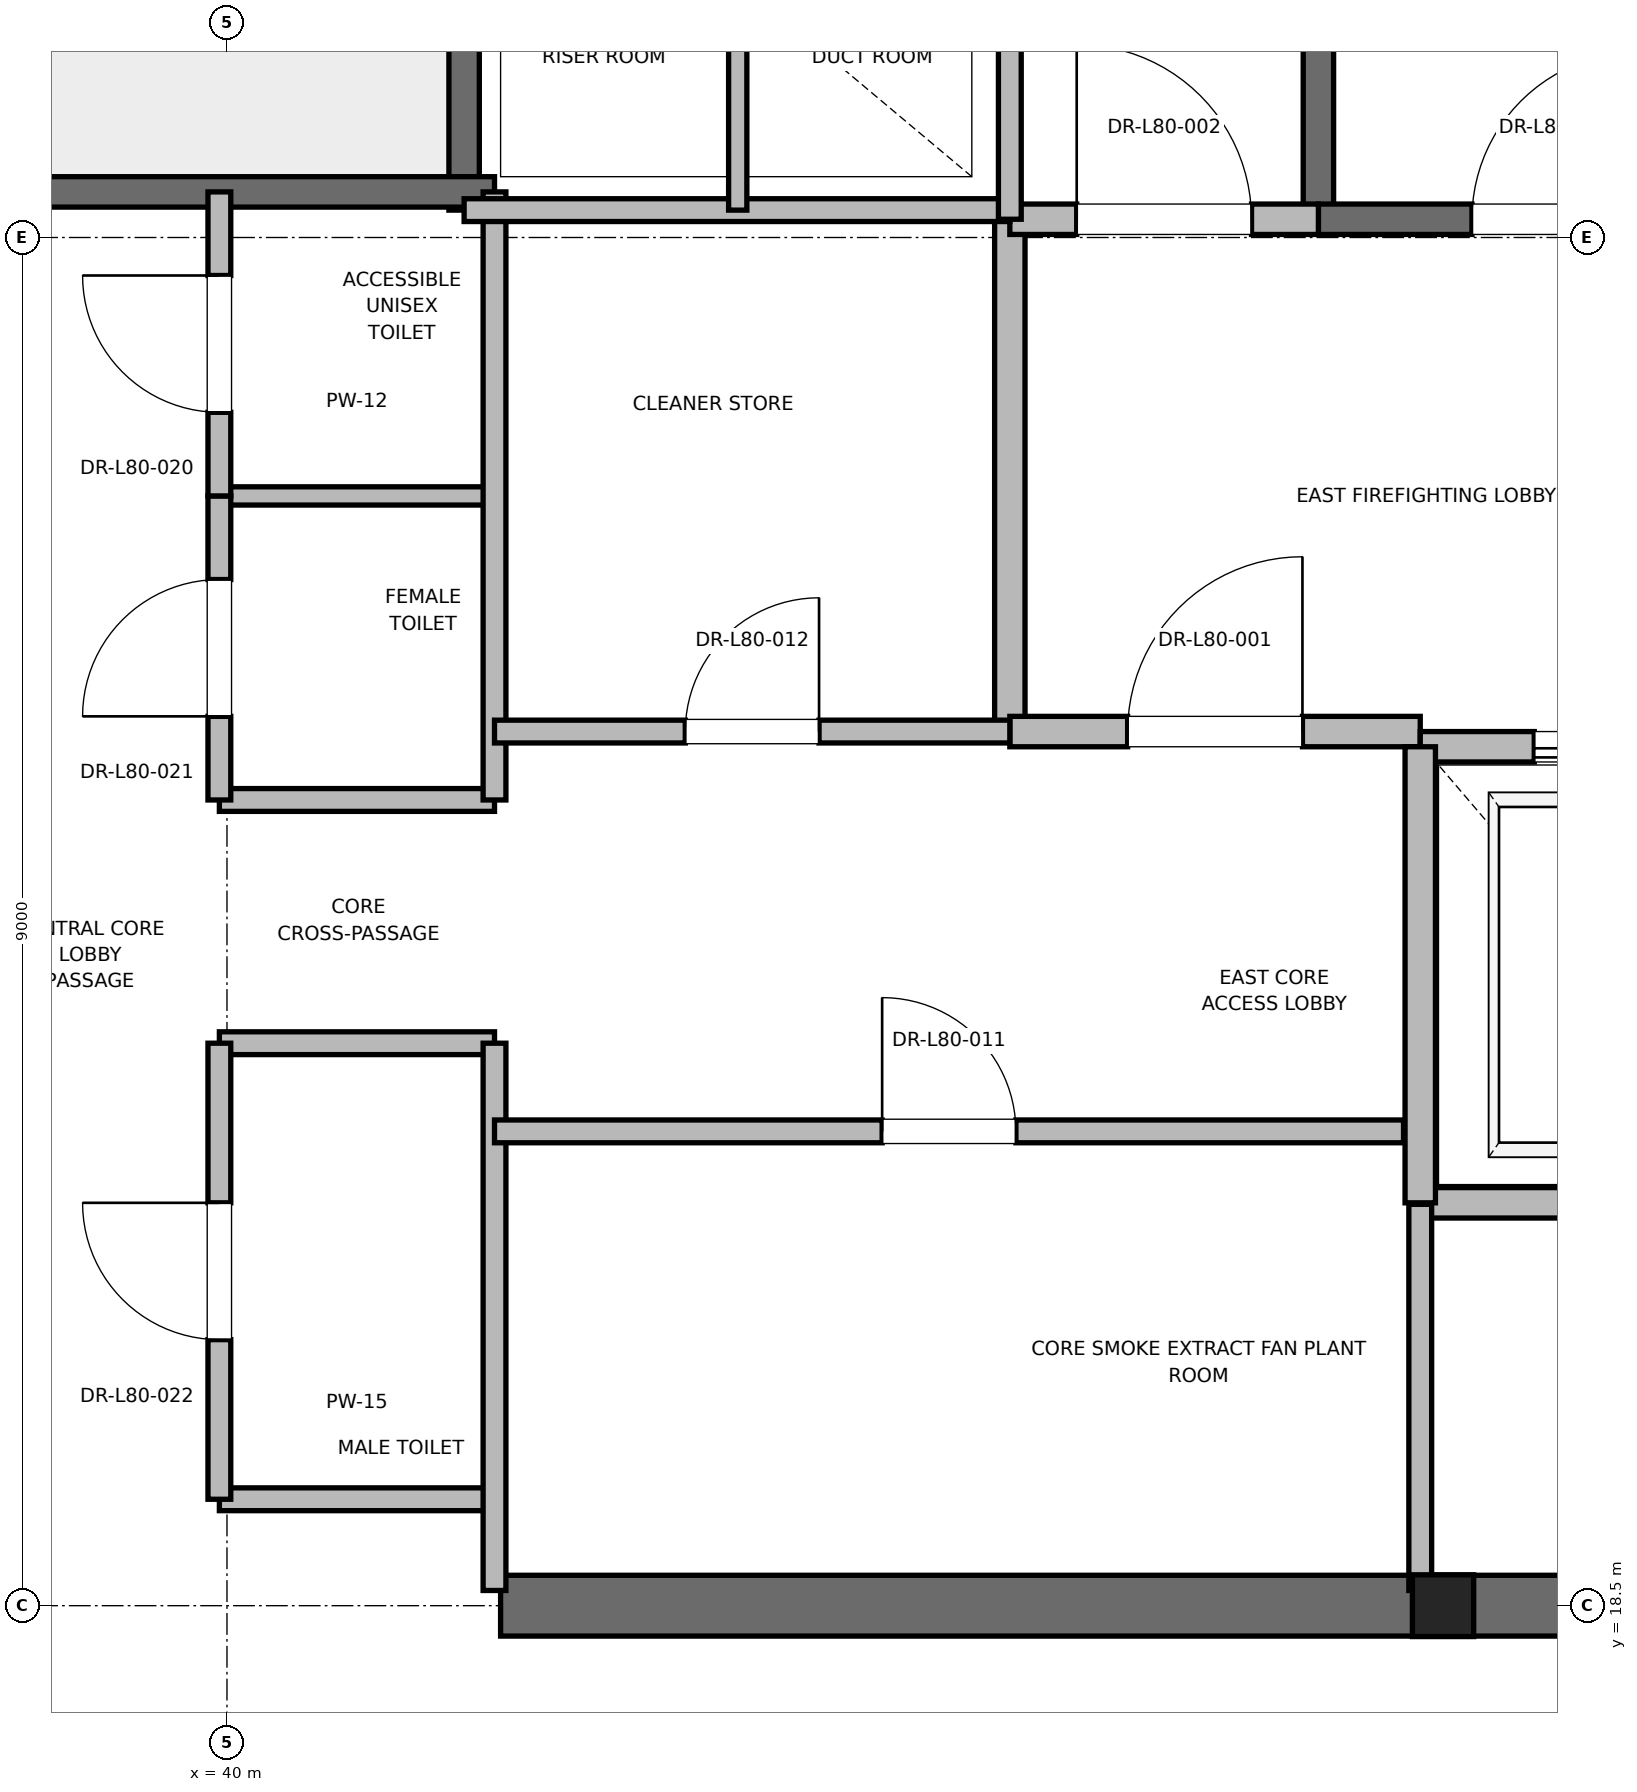
"""IFC4 building model, lengths in metres.
Left out: names, types, materials, properties, quantities, classifications, styles, units other than length and angle.
Written with IfcOpenShell. Run it as: python <this file> out.ifc"""

import sys

from ifc_helpers import new_model, si_unit, direction, frame, frame_2d, origin, origin_2d, place, context, subcontext, project, spatial, rectangle, i_section, extrude, element, fill, save


model = new_model("IFC4")
c1 = context("Model", 3, precision=1e-05, world=origin(), true_north=direction((0.0, 1.0)))
c2 = subcontext(c1, "Body", "Model", "MODEL_VIEW")
j1 = project(units=[si_unit("LENGTHUNIT", "METRE"), si_unit("PLANEANGLEUNIT", "RADIAN")], contexts=[c1])
p1 = place(None, origin())
s1 = spatial("IfcSite", under=j1, at=p1, CompositionType="ELEMENT")
p2 = place(p1, origin())
s2 = spatial("IfcBuilding", under=s1, at=p2, CompositionType="ELEMENT")
p3 = place(p2, frame((0.0, 0.0, 342.8)))
s3 = spatial("IfcBuildingStorey", under=s2, at=p3, CompositionType="ELEMENT", Elevation=342.8)
p4 = place(p3, frame((48.0, 18.5, 0.0), z_axis=(0.0, 0.0, 1.0), x_axis=(1.0, 0.0, 0.0)))
e1 = element("IfcColumn", 1, at=p4, inside=s3, PredefinedType="COLUMN", context=c2, shape_type="SweptSolid", body=[
    extrude(i_section(OverallWidth=0.403, OverallDepth=0.406, WebThickness=0.027, FlangeThickness=0.043, FilletRadius=0.015, at=origin_2d()), origin(), (0.0, 0.0, 1.0), 6.0),
])
p5 = place(p3, frame((41.8, 18.5, 0.0), z_axis=(0.0, 0.0, 1.0), x_axis=(1.0, 0.0, 0.0)))
e2 = element("IfcWall", 2, at=p5, inside=s3, PredefinedType="SHEAR", context=c2, shape_type="SweptSolid", body=[
    extrude(rectangle(XDim=9.2, YDim=0.4, at=frame_2d((4.6, 0.0))), origin(), (0.0, 0.0, 1.0), 5.7),
])
p6 = place(p3, frame((47.18, 27.62, 0.0), z_axis=(0.0, 0.0, 1.0), x_axis=(0.0, 1.0, 0.0)))
e3 = element("IfcWall", 3, at=p6, inside=s3, PredefinedType="SOLIDWALL", context=c2, shape_type="SweptSolid", body=[
    extrude(rectangle(XDim=8.18, YDim=0.2, at=frame_2d((4.09, 0.0))), origin(), (0.0, 0.0, 1.0), 5.7),
])
p7 = place(p3, frame((47.18, 27.62, 0.0), z_axis=(0.0, 0.0, 1.0), x_axis=(1.0, 0.0, 0.0)))
e4 = element("IfcWall", 4, at=p7, inside=s3, PredefinedType="SOLIDWALL", context=c2, shape_type="SweptSolid", body=[
    extrude(rectangle(XDim=3.12, YDim=0.2, at=frame_2d((1.56, 0.0))), origin(), (0.0, 0.0, 1.0), 5.7),
])
p8 = place(p7, frame((1.01, 0.0, 0.0)))
e5 = element("IfcOpeningElement", 5, at=p8, cuts=e4, PredefinedType="OPENING", context=c2, shape_type="SweptSolid", body=[
    extrude(rectangle(XDim=1.1, YDim=2.15, at=frame_2d((0.55, 1.075))), frame((0.0, 0.1, 0.0), z_axis=(0.0, -1.0, 0.0), x_axis=(1.0, 0.0, 0.0)), (0.0, 0.0, 1.0), 0.2),
])
p9 = place(p3, frame((41.56, 27.68, 0.0), z_axis=(0.0, 0.0, 1.0), x_axis=(0.0, 1.0, 0.0)))
e6 = element("IfcWall", 6, at=p9, inside=s3, PredefinedType="SOLIDWALL", context=c2, shape_type="SweptSolid", body=[
    extrude(rectangle(XDim=8.57, YDim=0.2, at=frame_2d((4.285, 0.0))), origin(), (0.0, 0.0, 1.0), 5.7),
])
p10 = place(p3, frame((38.44, 27.8, 0.0), z_axis=(0.0, 0.0, 1.0), x_axis=(1.0, 0.0, 0.0)))
e7 = element("IfcWall", 7, at=p10, inside=s3, PredefinedType="SOLIDWALL", context=c2, shape_type="SweptSolid", body=[
    extrude(rectangle(XDim=3.32, YDim=0.2, at=frame_2d((1.66, 0.0))), origin(), (0.0, 0.0, 1.0), 5.7),
])
p11 = place(p3, frame((45.15, 24.25, 0.0), z_axis=(0.0, 0.0, 1.0), x_axis=(0.0, 1.0, 0.0)))
e8 = element("IfcWall", 8, at=p11, inside=s3, PredefinedType="PARTITIONING", context=c2, shape_type="SweptSolid", body=[
    extrude(rectangle(XDim=3.37, YDim=0.2, at=frame_2d((1.685, 0.0))), origin(), (0.0, 0.0, 1.0), 5.7),
])
p12 = place(p3, frame((45.15, 24.25, 0.0), z_axis=(0.0, 0.0, 1.0), x_axis=(1.0, 0.0, 0.0)))
e9 = element("IfcWall", 9, at=p12, inside=s3, PredefinedType="PARTITIONING", context=c2, shape_type="SweptSolid", body=[
    extrude(rectangle(XDim=2.7, YDim=0.2, at=frame_2d((1.35, 0.0))), origin(), (0.0, 0.0, 1.0), 5.7),
])
p13 = place(p12, frame((0.775, 0.0, 0.0)))
e10 = element("IfcOpeningElement", 10, at=p13, cuts=e9, PredefinedType="OPENING", context=c2, shape_type="SweptSolid", body=[
    extrude(rectangle(XDim=1.15, YDim=2.2, at=frame_2d((0.575, 1.1))), frame((0.0, 0.1, 0.0), z_axis=(0.0, -1.0, 0.0), x_axis=(1.0, 0.0, 0.0)), (0.0, 0.0, 1.0), 0.2),
])
p14 = place(p3, frame((45.15, 27.62, 0.0), z_axis=(0.0, 0.0, 1.0), x_axis=(1.0, 0.0, 0.0)))
e11 = element("IfcWall", 11, at=p14, inside=s3, PredefinedType="PARTITIONING", context=c2, shape_type="SweptSolid", body=[
    extrude(rectangle(XDim=2.03, YDim=0.2, at=frame_2d((1.015, 0.0))), origin(), (0.0, 0.0, 1.0), 5.7),
])
p15 = place(p14, frame((0.44, 0.0, 0.0)))
e12 = element("IfcOpeningElement", 12, at=p15, cuts=e11, PredefinedType="OPENING", context=c2, shape_type="SweptSolid", body=[
    extrude(rectangle(XDim=1.15, YDim=2.2, at=frame_2d((0.575, 1.1))), frame((0.0, 0.1, 0.0), z_axis=(0.0, -1.0, 0.0), x_axis=(1.0, 0.0, 0.0)), (0.0, 0.0, 1.0), 0.2),
])
p16 = place(p3, frame((47.85, 21.15, 0.0), z_axis=(0.0, 0.0, 1.0), x_axis=(1.0, 0.0, 0.0)))
e13 = element("IfcWall", 13, at=p16, inside=s3, PredefinedType="SOLIDWALL", context=c2, shape_type="SweptSolid", body=[
    extrude(rectangle(XDim=2.6, YDim=0.2, at=frame_2d((1.3, 0.0))), origin(), (0.0, 0.0, 1.0), 5.7),
])
p17 = place(p3, frame((50.45, 24.15, 0.0), z_axis=(0.0, 0.0, 1.0), x_axis=(-1.0, 0.0, 0.0)))
e14 = element("IfcWall", 14, at=p17, inside=s3, PredefinedType="SOLIDWALL", context=c2, shape_type="SweptSolid", body=[
    extrude(rectangle(XDim=2.6, YDim=0.2, at=frame_2d((1.3, 0.0))), origin(), (0.0, 0.0, 1.0), 4.78),
])
p18 = place(p17, frame((0.75, 0.0, 0.0)))
e15 = element("IfcOpeningElement", 15, at=p18, cuts=e14, PredefinedType="OPENING", context=c2, shape_type="SweptSolid", body=[
    extrude(rectangle(XDim=1.1, YDim=2.2, at=frame_2d((0.55, 1.1))), frame((0.0, 0.1, 0.0), z_axis=(0.0, -1.0, 0.0), x_axis=(1.0, 0.0, 0.0)), (0.0, 0.0, 1.0), 0.2),
])
p19 = place(p3, frame((47.85, 24.15, 0.0), z_axis=(0.0, 0.0, 1.0), x_axis=(0.0, -1.0, 0.0)))
e16 = element("IfcWall", 16, at=p19, inside=s3, PredefinedType="SOLIDWALL", context=c2, shape_type="SweptSolid", body=[
    extrude(rectangle(XDim=3.0, YDim=0.2, at=frame_2d((1.5, 0.0))), origin(), (0.0, 0.0, 1.0), 5.7),
])
for number, where, z_axis, x_axis in (
    (17, (39.95, 19.2, 0.0), (0.0, 0.0, 1.0), (1.0, 0.0, 0.0)),
    (18, (39.95, 22.2, 0.0), (0.0, 0.0, 1.0), (1.0, 0.0, 0.0)),
    (19, (39.95, 23.8, 0.0), (0.0, 0.0, 1.0), (1.0, 0.0, 0.0)),
):
    element("IfcWall", number, at=place(p3, frame(where, z_axis=z_axis, x_axis=x_axis)), inside=s3, PredefinedType="PARTITIONING", context=c2, shape_type="SweptSolid", body=[
        extrude(rectangle(XDim=1.81, YDim=0.15, at=frame_2d((0.905, 0.0))), origin(), (0.0, 0.0, 1.0), 2.85),
    ])
p20 = place(p3, frame((39.95, 25.8, 0.0), z_axis=(0.0, 0.0, 1.0), x_axis=(1.0, 0.0, 0.0)))
e20 = element("IfcWall", 20, at=p20, inside=s3, PredefinedType="PARTITIONING", context=c2, shape_type="SweptSolid", body=[
    extrude(rectangle(XDim=1.81, YDim=0.12, at=frame_2d((0.905, 0.0))), origin(), (0.0, 0.0, 1.0), 2.85),
])
p21 = place(p3, frame((41.76, 18.6, 0.0), z_axis=(0.0, 0.0, 1.0), x_axis=(0.0, 1.0, 0.0)))
e21 = element("IfcWall", 21, at=p21, inside=s3, PredefinedType="PARTITIONING", context=c2, shape_type="SweptSolid", body=[
    extrude(rectangle(XDim=3.6, YDim=0.15, at=frame_2d((1.8, 0.0))), origin(), (0.0, 0.0, 1.0), 2.85),
])
p22 = place(p3, frame((41.76, 23.8, 0.0), z_axis=(0.0, 0.0, 1.0), x_axis=(0.0, 1.0, 0.0)))
e22 = element("IfcWall", 22, at=p22, inside=s3, PredefinedType="PARTITIONING", context=c2, shape_type="SweptSolid", body=[
    extrude(rectangle(XDim=4.0, YDim=0.15, at=frame_2d((2.0, 0.0))), origin(), (0.0, 0.0, 1.0), 2.85),
])
p23 = place(p3, frame((39.95, 19.2, 0.0), z_axis=(0.0, 0.0, 1.0), x_axis=(0.0, 1.0, 0.0)))
e23 = element("IfcWall", 23, at=p23, inside=s3, PredefinedType="PARTITIONING", context=c2, shape_type="SweptSolid", body=[
    extrude(rectangle(XDim=3.0, YDim=0.15, at=frame_2d((1.5, 0.0))), origin(), (0.0, 0.0, 1.0), 2.85),
])
p24 = place(p23, frame((1.05, 0.0, 0.0)))
e24 = element("IfcOpeningElement", 24, at=p24, cuts=e23, PredefinedType="OPENING", context=c2, shape_type="SweptSolid", body=[
    extrude(rectangle(XDim=0.9, YDim=2.1, at=frame_2d((0.45, 1.05))), frame((0.0, 0.075, 0.0), z_axis=(0.0, -1.0, 0.0), x_axis=(1.0, 0.0, 0.0)), (0.0, 0.0, 1.0), 0.15),
])
p25 = place(p3, frame((39.95, 23.8, 0.0), z_axis=(0.0, 0.0, 1.0), x_axis=(0.0, 1.0, 0.0)))
e25 = element("IfcWall", 25, at=p25, inside=s3, PredefinedType="PARTITIONING", context=c2, shape_type="SweptSolid", body=[
    extrude(rectangle(XDim=2.0, YDim=0.15, at=frame_2d((1.0, 0.0))), origin(), (0.0, 0.0, 1.0), 2.85),
])
p26 = place(p25, frame((0.55, 0.0, 0.0)))
e26 = element("IfcOpeningElement", 26, at=p26, cuts=e25, PredefinedType="OPENING", context=c2, shape_type="SweptSolid", body=[
    extrude(rectangle(XDim=0.9, YDim=2.1, at=frame_2d((0.45, 1.05))), frame((0.0, 0.075, 0.0), z_axis=(0.0, -1.0, 0.0), x_axis=(1.0, 0.0, 0.0)), (0.0, 0.0, 1.0), 0.15),
])
p27 = place(p3, frame((39.95, 25.8, 0.0), z_axis=(0.0, 0.0, 1.0), x_axis=(0.0, 1.0, 0.0)))
e27 = element("IfcWall", 27, at=p27, inside=s3, PredefinedType="PARTITIONING", context=c2, shape_type="SweptSolid", body=[
    extrude(rectangle(XDim=2.0, YDim=0.15, at=frame_2d((1.0, 0.0))), origin(), (0.0, 0.0, 1.0), 2.85),
])
p28 = place(p27, frame((0.55, 0.0, 0.0)))
e28 = element("IfcOpeningElement", 28, at=p28, cuts=e27, PredefinedType="OPENING", context=c2, shape_type="SweptSolid", body=[
    extrude(rectangle(XDim=0.9, YDim=2.1, at=frame_2d((0.45, 1.05))), frame((0.0, 0.075, 0.0), z_axis=(0.0, -1.0, 0.0), x_axis=(1.0, 0.0, 0.0)), (0.0, 0.0, 1.0), 0.15),
])
p29 = place(p3, frame((41.56, 27.68, 0.0), z_axis=(0.0, 0.0, 1.0), x_axis=(1.0, 0.0, 0.0)))
e29 = element("IfcWall", 29, at=p29, inside=s3, PredefinedType="PARTITIONING", context=c2, shape_type="SweptSolid", body=[
    extrude(rectangle(XDim=3.59, YDim=0.15, at=frame_2d((1.795, 0.0))), origin(), (0.0, 0.0, 1.0), 2.85),
])
p30 = place(p3, frame((47.85, 18.6, 0.0), z_axis=(0.0, 0.0, 1.0), x_axis=(0.0, 1.0, 0.0)))
e30 = element("IfcWall", 30, at=p30, inside=s3, PredefinedType="PARTITIONING", context=c2, shape_type="SweptSolid", body=[
    extrude(rectangle(XDim=2.54, YDim=0.15, at=frame_2d((1.27, 0.0))), origin(), (0.0, 0.0, 1.0), 2.85),
])
p31 = place(p3, frame((41.76, 21.62, 0.0), z_axis=(0.0, 0.0, 1.0), x_axis=(1.0, 0.0, 0.0)))
e31 = element("IfcWall", 31, at=p31, inside=s3, PredefinedType="PARTITIONING", context=c2, shape_type="SweptSolid", body=[
    extrude(rectangle(XDim=5.98, YDim=0.15, at=frame_2d((2.99, 0.0))), origin(), (0.0, 0.0, 1.0), 2.85),
])
p32 = place(p31, frame((2.55, 0.0, 0.0)))
e32 = element("IfcOpeningElement", 32, at=p32, cuts=e31, PredefinedType="OPENING", context=c2, shape_type="SweptSolid", body=[
    extrude(rectangle(XDim=0.88, YDim=2.1, at=frame_2d((0.44, 1.05))), frame((0.0, 0.075, 0.0), z_axis=(0.0, -1.0, 0.0), x_axis=(1.0, 0.0, 0.0)), (0.0, 0.0, 1.0), 0.15),
])
p33 = place(p3, frame((41.76, 24.25, 0.0), z_axis=(0.0, 0.0, 1.0), x_axis=(1.0, 0.0, 0.0)))
e33 = element("IfcWall", 33, at=p33, inside=s3, PredefinedType="PARTITIONING", context=c2, shape_type="SweptSolid", body=[
    extrude(rectangle(XDim=3.39, YDim=0.15, at=frame_2d((1.695, 0.0))), origin(), (0.0, 0.0, 1.0), 2.85),
])
p34 = place(p33, frame((1.255, 0.0, 0.0)))
e34 = element("IfcOpeningElement", 34, at=p34, cuts=e33, PredefinedType="OPENING", context=c2, shape_type="SweptSolid", body=[
    extrude(rectangle(XDim=0.88, YDim=2.1, at=frame_2d((0.44, 1.05))), frame((0.0, 0.075, 0.0), z_axis=(0.0, -1.0, 0.0), x_axis=(1.0, 0.0, 0.0)), (0.0, 0.0, 1.0), 0.15),
])
p35 = place(p3, frame((45.15, 27.62, 0.0), z_axis=(0.0, 0.0, 1.0), x_axis=(0.0, 1.0, 0.0)))
e35 = element("IfcWall", 35, at=p35, inside=s3, PredefinedType="PARTITIONING", context=c2, shape_type="SweptSolid", body=[
    extrude(rectangle(XDim=3.1, YDim=0.15, at=frame_2d((1.55, 0.0))), origin(), (0.0, 0.0, 1.0), 2.85),
])
p36 = place(p3, frame((43.36, 27.68, 0.0), z_axis=(0.0, 0.0, 1.0), x_axis=(0.0, 1.0, 0.0)))
e36 = element("IfcWall", 36, at=p36, inside=s3, PredefinedType="PARTITIONING", context=c2, shape_type="SweptSolid", body=[
    extrude(rectangle(XDim=3.04, YDim=0.12, at=frame_2d((1.52, 0.0))), origin(), (0.0, 0.0, 1.0), 2.85),
])
p37 = place(p8, origin())
e37 = element("IfcDoor", 37, at=p37, inside=s3, OperationType="SINGLE_SWING_RIGHT", PredefinedType="DOOR", context=c2, shape_type="SweptSolid", body=[
    extrude(rectangle(XDim=1.1, YDim=2.15, at=frame_2d((0.55, 1.075))), frame((0.0, 0.025, 0.0), z_axis=(0.0, -1.0, 0.0), x_axis=(1.0, 0.0, 0.0)), (0.0, 0.0, 1.0), 0.05),
])
fill(e5, e37)
p38 = place(p13, origin())
e38 = element("IfcDoor", 38, at=p38, inside=s3, OperationType="SINGLE_SWING_RIGHT", PredefinedType="DOOR", context=c2, shape_type="SweptSolid", body=[
    extrude(rectangle(XDim=1.15, YDim=2.2, at=frame_2d((0.575, 1.1))), frame((0.0, 0.025, 0.0), z_axis=(0.0, -1.0, 0.0), x_axis=(1.0, 0.0, 0.0)), (0.0, 0.0, 1.0), 0.05),
])
fill(e10, e38)
p39 = place(p15, origin())
e39 = element("IfcDoor", 39, at=p39, inside=s3, OperationType="SINGLE_SWING_LEFT", PredefinedType="DOOR", context=c2, shape_type="SweptSolid", body=[
    extrude(rectangle(XDim=1.15, YDim=2.2, at=frame_2d((0.575, 1.1))), frame((0.0, 0.025, 0.0), z_axis=(0.0, -1.0, 0.0), x_axis=(1.0, 0.0, 0.0)), (0.0, 0.0, 1.0), 0.05),
])
fill(e12, e39)
p40 = place(p18, origin())
e40 = element("IfcDoor", 40, at=p40, inside=s3, OperationType="SLIDING_TO_RIGHT", PredefinedType="DOOR", context=c2, shape_type="SweptSolid", body=[
    extrude(rectangle(XDim=1.1, YDim=2.2, at=frame_2d((0.55, 1.1))), frame((0.0, 0.025, 0.0), z_axis=(0.0, -1.0, 0.0), x_axis=(1.0, 0.0, 0.0)), (0.0, 0.0, 1.0), 0.05),
])
fill(e15, e40)
p41 = place(p24, origin())
e41 = element("IfcDoor", 41, at=p41, inside=s3, OperationType="SINGLE_SWING_RIGHT", PredefinedType="DOOR", context=c2, shape_type="SweptSolid", body=[
    extrude(rectangle(XDim=0.9, YDim=2.1, at=frame_2d((0.45, 1.05))), frame((0.0, 0.025, 0.0), z_axis=(0.0, -1.0, 0.0), x_axis=(1.0, 0.0, 0.0)), (0.0, 0.0, 1.0), 0.05),
])
fill(e24, e41)
p42 = place(p26, origin())
e42 = element("IfcDoor", 42, at=p42, inside=s3, OperationType="SINGLE_SWING_LEFT", PredefinedType="DOOR", context=c2, shape_type="SweptSolid", body=[
    extrude(rectangle(XDim=0.9, YDim=2.1, at=frame_2d((0.45, 1.05))), frame((0.0, 0.025, 0.0), z_axis=(0.0, -1.0, 0.0), x_axis=(1.0, 0.0, 0.0)), (0.0, 0.0, 1.0), 0.05),
])
fill(e26, e42)
p43 = place(p28, origin())
e43 = element("IfcDoor", 43, at=p43, inside=s3, OperationType="SINGLE_SWING_RIGHT", PredefinedType="DOOR", context=c2, shape_type="SweptSolid", body=[
    extrude(rectangle(XDim=0.9, YDim=2.1, at=frame_2d((0.45, 1.05))), frame((0.0, 0.025, 0.0), z_axis=(0.0, -1.0, 0.0), x_axis=(1.0, 0.0, 0.0)), (0.0, 0.0, 1.0), 0.05),
])
fill(e28, e43)
p44 = place(p32, origin())
e44 = element("IfcDoor", 44, at=p44, inside=s3, OperationType="SINGLE_SWING_LEFT", PredefinedType="DOOR", context=c2, shape_type="SweptSolid", body=[
    extrude(rectangle(XDim=0.88, YDim=2.1, at=frame_2d((0.44, 1.05))), frame((0.0, 0.025, 0.0), z_axis=(0.0, -1.0, 0.0), x_axis=(1.0, 0.0, 0.0)), (0.0, 0.0, 1.0), 0.05),
])
fill(e32, e44)
p45 = place(p34, origin())
e45 = element("IfcDoor", 45, at=p45, inside=s3, OperationType="SINGLE_SWING_RIGHT", PredefinedType="DOOR", context=c2, shape_type="SweptSolid", body=[
    extrude(rectangle(XDim=0.88, YDim=2.1, at=frame_2d((0.44, 1.05))), frame((0.0, 0.025, 0.0), z_axis=(0.0, -1.0, 0.0), x_axis=(1.0, 0.0, 0.0)), (0.0, 0.0, 1.0), 0.05),
])
fill(e34, e45)
save(model, sys.argv[1])
